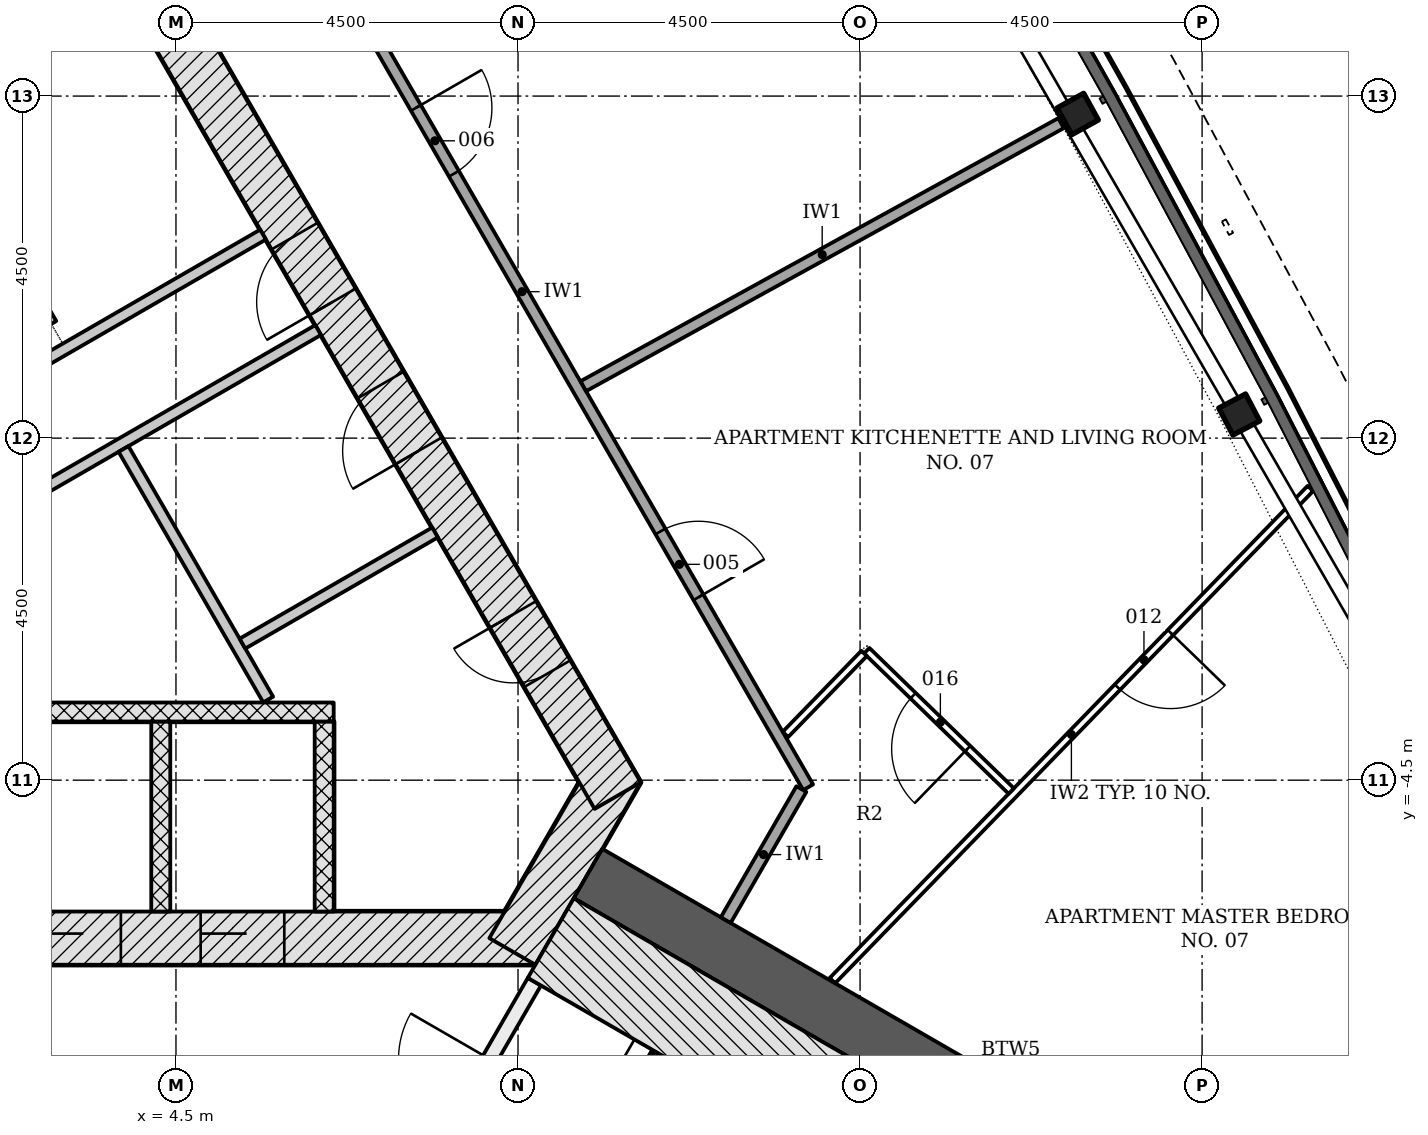
"""IFC4 building model, lengths in metres.
Left out: names, types, materials, properties, quantities, classifications, styles, units other than length and angle.
Written with IfcOpenShell. Run it as: python <this file> out.ifc"""

import sys

from ifc_helpers import new_model, si_unit, direction, frame, frame_2d, origin, origin_2d, place, context, subcontext, project, spatial, polyline, rectangle, i_section, outline, extrude, element, fill, save


model = new_model("IFC4")
c1 = context("Model", 3, precision=1e-05, world=origin(), true_north=direction((0.0, 1.0)))
c2 = subcontext(c1, "Body", "Model", "MODEL_VIEW")
j1 = project(units=[si_unit("LENGTHUNIT", "METRE"), si_unit("PLANEANGLEUNIT", "RADIAN")], contexts=[c1])
p1 = place(None, origin())
s1 = spatial("IfcSite", under=j1, at=p1, CompositionType="ELEMENT")
p2 = place(p1, origin())
s2 = spatial("IfcBuilding", under=s1, at=p2, CompositionType="ELEMENT")
p3 = place(p2, frame((0.0, 0.0, 116.7)))
s3 = spatial("IfcBuildingStorey", under=s2, at=p3, CompositionType="ELEMENT", Elevation=116.7)
p4 = place(p3, frame((-9.229, -6.578, -0.2), z_axis=(0.0, 0.0, 1.0), x_axis=(1.0, 0.0, 0.0)))
e1 = element("IfcWall", 1, at=p4, inside=s3, PredefinedType="SHEAR", context=c2, shape_type="SweptSolid", body=[
    extrude(rectangle(XDim=18.458, YDim=0.7, at=frame_2d((9.229, 0.0))), origin(), (0.0, 0.0, 1.0), 3.6),
])
p5 = place(p4, frame((3.304, 0.0, 0.2)))
e2 = element("IfcOpeningElement", 2, at=p5, cuts=e1, PredefinedType="OPENING", context=c2, shape_type="SweptSolid", body=[
    extrude(rectangle(XDim=1.1, YDim=2.1, at=frame_2d((0.55, 1.05))), frame((0.0, 0.36, 0.0), z_axis=(0.0, -1.0, 0.0), x_axis=(1.0, 0.0, 0.0)), (0.0, 0.0, 1.0), 0.72),
])
p6 = place(p4, frame((5.454, 0.0, 0.2)))
e3 = element("IfcOpeningElement", 3, at=p6, cuts=e1, PredefinedType="OPENING", context=c2, shape_type="SweptSolid", body=[
    extrude(rectangle(XDim=1.1, YDim=2.1, at=frame_2d((0.55, 1.05))), frame((0.0, 0.36, 0.0), z_axis=(0.0, -1.0, 0.0), x_axis=(1.0, 0.0, 0.0)), (0.0, 0.0, 1.0), 0.72),
])
p7 = place(p4, frame((7.604, 0.0, 0.2)))
e4 = element("IfcOpeningElement", 4, at=p7, cuts=e1, PredefinedType="OPENING", context=c2, shape_type="SweptSolid", body=[
    extrude(rectangle(XDim=1.1, YDim=2.1, at=frame_2d((0.55, 1.05))), frame((0.0, 0.36, 0.0), z_axis=(0.0, -1.0, 0.0), x_axis=(1.0, 0.0, 0.0)), (0.0, 0.0, 1.0), 0.72),
])
p8 = place(p4, frame((9.754, 0.0, 0.2)))
e5 = element("IfcOpeningElement", 5, at=p8, cuts=e1, PredefinedType="OPENING", context=c2, shape_type="SweptSolid", body=[
    extrude(rectangle(XDim=1.1, YDim=2.1, at=frame_2d((0.55, 1.05))), frame((0.0, 0.36, 0.0), z_axis=(0.0, -1.0, 0.0), x_axis=(1.0, 0.0, 0.0)), (0.0, 0.0, 1.0), 0.72),
])
p9 = place(p4, frame((11.904, 0.0, 0.2)))
e6 = element("IfcOpeningElement", 6, at=p9, cuts=e1, PredefinedType="OPENING", context=c2, shape_type="SweptSolid", body=[
    extrude(rectangle(XDim=1.1, YDim=2.1, at=frame_2d((0.55, 1.05))), frame((0.0, 0.36, 0.0), z_axis=(0.0, -1.0, 0.0), x_axis=(1.0, 0.0, 0.0)), (0.0, 0.0, 1.0), 0.72),
])
p10 = place(p4, frame((14.054, 0.0, 0.2)))
e7 = element("IfcOpeningElement", 7, at=p10, cuts=e1, PredefinedType="OPENING", context=c2, shape_type="SweptSolid", body=[
    extrude(rectangle(XDim=1.1, YDim=2.1, at=frame_2d((0.55, 1.05))), frame((0.0, 0.36, 0.0), z_axis=(0.0, -1.0, 0.0), x_axis=(1.0, 0.0, 0.0)), (0.0, 0.0, 1.0), 0.72),
])
p11 = place(p4, frame((0.926, 0.0, 0.2)))
e8 = element("IfcOpeningElement", 8, at=p11, cuts=e1, PredefinedType="OPENING", context=c2, shape_type="SweptSolid", body=[
    extrude(rectangle(XDim=0.9, YDim=2.1, at=frame_2d((0.45, 1.05))), frame((0.0, 0.36, 0.0), z_axis=(0.0, -1.0, 0.0), x_axis=(1.0, 0.0, 0.0)), (0.0, 0.0, 1.0), 0.72),
])
p12 = place(p3, frame((8.926, -6.753, -0.2), z_axis=(0.0, 0.0, 1.0), x_axis=(0.500042739161, 0.866000726912, 0.0)))
e9 = element("IfcWall", 9, at=p12, inside=s3, PredefinedType="SHEAR", context=c2, shape_type="SweptSolid", body=[
    extrude(rectangle(XDim=2.771, YDim=0.7, at=frame_2d((1.386, 0.0))), origin(), (0.0, 0.0, 1.0), 3.6),
])
p13 = place(p3, frame((10.311, -4.703, -0.2), z_axis=(0.0, 0.0, 1.0), x_axis=(-0.500001446645, 0.866024568562, 0.0)))
e10 = element("IfcWall", 10, at=p13, inside=s3, PredefinedType="SHEAR", context=c2, shape_type="SweptSolid", body=[
    extrude(rectangle(XDim=18.458, YDim=0.7, at=frame_2d((9.229, 0.0))), origin(), (0.0, 0.0, 1.0), 3.6),
])
p14 = place(p13, frame((7.5, 0.0, 0.2)))
e11 = element("IfcOpeningElement", 11, at=p14, cuts=e10, PredefinedType="OPENING", context=c2, shape_type="SweptSolid", body=[
    extrude(rectangle(XDim=1.0, YDim=2.1, at=frame_2d((0.5, 1.05))), frame((0.0, 0.36, 0.0), z_axis=(0.0, -1.0, 0.0), x_axis=(1.0, 0.0, 0.0)), (0.0, 0.0, 1.0), 0.72),
])
p15 = place(p13, frame((1.852, 0.0, 0.2)))
e12 = element("IfcOpeningElement", 12, at=p15, cuts=e10, PredefinedType="OPENING", context=c2, shape_type="SweptSolid", body=[
    extrude(rectangle(XDim=0.9, YDim=2.1, at=frame_2d((0.45, 1.05))), frame((0.0, 0.36, 0.0), z_axis=(0.0, -1.0, 0.0), x_axis=(1.0, 0.0, 0.0)), (0.0, 0.0, 1.0), 0.72),
])
p16 = place(p13, frame((5.238, 0.0, 0.2)))
e13 = element("IfcOpeningElement", 13, at=p16, cuts=e10, PredefinedType="OPENING", context=c2, shape_type="SweptSolid", body=[
    extrude(rectangle(XDim=1.0, YDim=2.1, at=frame_2d((0.5, 1.05))), frame((0.0, 0.36, 0.0), z_axis=(0.0, -1.0, 0.0), x_axis=(1.0, 0.0, 0.0)), (0.0, 0.0, 1.0), 0.72),
])
p17 = place(p13, frame((13.63, 0.0, 0.2)))
e14 = element("IfcOpeningElement", 14, at=p17, cuts=e10, PredefinedType="OPENING", context=c2, shape_type="SweptSolid", body=[
    extrude(rectangle(XDim=0.9, YDim=2.1, at=frame_2d((0.45, 1.05))), frame((0.0, 0.36, 0.0), z_axis=(0.0, -1.0, 0.0), x_axis=(1.0, 0.0, 0.0)), (0.0, 0.0, 1.0), 0.72),
])
p18 = place(p3, frame((9.922, -5.728, -0.2), z_axis=(0.0, 0.0, 1.0), x_axis=(0.866024913782, -0.500000848707, 0.0)))
e15 = element("IfcWall", 15, at=p18, inside=s3, PredefinedType="SHEAR", context=c2, shape_type="SweptSolid", body=[
    extrude(rectangle(XDim=11.539, YDim=0.75, at=frame_2d((5.769, 0.0))), origin(), (0.0, 0.0, 1.0), 3.6),
])
for number, where, z_axis, x_axis in (
    (16, (18.489, 0.311, -0.2), (0.0, 0.0, 1.0), (-0.464, 0.886, 0.0)),
    (17, (16.364, 4.265, -0.2), (0.0, 0.0, 1.0), (-0.482, 0.876, 0.0)),
):
    element("IfcColumn", number, at=place(p3, frame(where, z_axis=z_axis, x_axis=x_axis)), inside=s3, PredefinedType="COLUMN", context=c2, shape_type="SweptSolid", body=[
        extrude(i_section(OverallWidth=0.401, OverallDepth=0.399, WebThickness=0.025, FlangeThickness=0.04, FilletRadius=0.015, at=origin_2d()), origin(), (0.0, 0.0, 1.0), 3.6),
    ])
p19 = place(p3, origin())
e18 = element("IfcWall", 18, at=p19, inside=s3, PredefinedType="NOTDEFINED", context=c2, shape_type="SweptSolid", body=[
    extrude(outline(polyline([(17.98, -16.169), (19.999, -15.995), (21.449, -15.625), (22.711, -14.819), (23.656, -13.658), (24.189, -12.259), (24.257, -10.763), (23.852, -9.322), (22.993, -7.487), (22.721, -7.614), (23.57, -9.426), (23.955, -10.798), (23.891, -12.197), (23.393, -13.506), (22.509, -14.592), (21.328, -15.347), (19.948, -15.699), (17.955, -15.87), (17.98, -16.169)])), origin(), (0.0, 0.0, 1.0), 3.3),
])
for number, where, z_axis, x_axis in (
    (19, (4.3, -6.228, -0.2), (0.0, 0.0, 1.0), (0.0, 1.0, 0.0)),
    (20, (6.45, -6.228, -0.2), (0.0, 0.0, 1.0), (0.0, 1.0, 0.0)),
):
    element("IfcWall", number, at=place(p3, frame(where, z_axis=z_axis, x_axis=x_axis)), inside=s3, PredefinedType="PARTITIONING", context=c2, shape_type="SweptSolid", body=[
        extrude(rectangle(XDim=2.5, YDim=0.25, at=frame_2d((1.25, 0.0))), origin(), (0.0, 0.0, 1.0), 3.6),
    ])
p20 = place(p3, frame((-6.575, -3.603, 0.0), z_axis=(0.0, 0.0, 1.0), x_axis=(1.0, 0.0, 0.0)))
e21 = element("IfcWall", 21, at=p20, inside=s3, PredefinedType="PARTITIONING", context=c2, shape_type="SweptSolid", body=[
    extrude(rectangle(XDim=13.15, YDim=0.25, at=frame_2d((6.575, 0.0))), origin(), (0.0, 0.0, 1.0), 3.4),
])
p21 = place(p3, frame((-4.904, -3.413, 0.0), z_axis=(0.0, 0.0, 1.0), x_axis=(0.866020716117, 0.500008119189, 0.0)))
e22 = element("IfcWall", 22, at=p21, inside=s3, PredefinedType="PARTITIONING", context=c2, shape_type="SweptSolid", body=[
    extrude(rectangle(XDim=12.182, YDim=0.15, at=frame_2d((6.091, 0.0))), origin(), (0.0, 0.0, 1.0), 3.4),
])
p22 = place(p21, frame((4.142, 0.0, 0.0)))
e23 = element("IfcOpeningElement", 23, at=p22, cuts=e22, PredefinedType="OPENING", context=c2, shape_type="SweptSolid", body=[
    extrude(rectangle(XDim=0.9, YDim=2.1, at=frame_2d((0.45, 1.05))), frame((0.0, 0.085, 0.0), z_axis=(0.0, -1.0, 0.0), x_axis=(1.0, 0.0, 0.0)), (0.0, 0.0, 1.0), 0.17),
])
p23 = place(p3, frame((-2.004, -3.413, 0.0), z_axis=(0.0, 0.0, 1.0), x_axis=(0.866030034802, 0.499991978756, 0.0)))
e24 = element("IfcWall", 24, at=p23, inside=s3, PredefinedType="PARTITIONING", context=c2, shape_type="SweptSolid", body=[
    extrude(rectangle(XDim=9.671, YDim=0.15, at=frame_2d((4.835, 0.0))), origin(), (0.0, 0.0, 1.0), 3.4),
])
p24 = place(p23, frame((2.886, 0.0, 0.0)))
e25 = element("IfcOpeningElement", 25, at=p24, cuts=e24, PredefinedType="OPENING", context=c2, shape_type="SweptSolid", body=[
    extrude(rectangle(XDim=0.9, YDim=2.1, at=frame_2d((0.45, 1.05))), frame((0.0, 0.085, 0.0), z_axis=(0.0, -1.0, 0.0), x_axis=(1.0, 0.0, 0.0)), (0.0, 0.0, 1.0), 0.17),
])
p25 = place(p3, frame((2.86, 1.503, 0.0), z_axis=(0.0, 0.0, 1.0), x_axis=(-0.500014382217, 0.866017100048, 0.0)))
e26 = element("IfcWall", 26, at=p25, inside=s3, PredefinedType="PARTITIONING", context=c2, shape_type="SweptSolid", body=[
    extrude(rectangle(XDim=5.502, YDim=0.15, at=frame_2d((2.751, 0.0))), origin(), (0.0, 0.0, 1.0), 3.4),
])
p26 = place(p3, frame((5.713, -3.439, 0.0), z_axis=(0.0, 0.0, 1.0), x_axis=(-0.499981559197, 0.866036050325, 0.0)))
e27 = element("IfcWall", 27, at=p26, inside=s3, PredefinedType="PARTITIONING", context=c2, shape_type="SweptSolid", body=[
    extrude(rectangle(XDim=3.806, YDim=0.15, at=frame_2d((1.903, 0.0))), origin(), (0.0, 0.0, 1.0), 3.4),
])
p27 = place(p3, frame((5.375, -2.703, 0.0), z_axis=(0.0, 0.0, 1.0), x_axis=(0.866046596414, 0.499963291492, 0.0)))
e28 = element("IfcWall", 28, at=p27, inside=s3, PredefinedType="PARTITIONING", context=c2, shape_type="SweptSolid", body=[
    extrude(rectangle(XDim=2.925, YDim=0.15, at=frame_2d((1.462, 0.0))), origin(), (0.0, 0.0, 1.0), 3.4),
])
p28 = place(p3, frame((7.44, -10.226, -0.2), z_axis=(0.0, 0.0, 1.0), x_axis=(0.500022077904, 0.866012656725, 0.0)))
e29 = element("IfcWall", 29, at=p28, inside=s3, PredefinedType="SHEAR", context=c2, shape_type="SweptSolid", body=[
    extrude(rectangle(XDim=3.55, YDim=0.2, at=frame_2d((1.775, 0.0))), origin(), (0.0, 0.0, 1.0), 3.6),
])
p29 = place(p28, frame((1.175, 0.0, 0.2)))
e30 = element("IfcOpeningElement", 30, at=p29, cuts=e29, PredefinedType="OPENING", context=c2, shape_type="SweptSolid", body=[
    extrude(rectangle(XDim=1.2, YDim=2.1, at=frame_2d((0.6, 1.05))), frame((0.0, 0.11, 0.0), z_axis=(0.0, -1.0, 0.0), x_axis=(1.0, 0.0, 0.0)), (0.0, 0.0, 1.0), 0.22),
])
p30 = place(p3, frame((9.431, -6.577, -0.2), z_axis=(0.0, 0.0, 1.0), x_axis=(0.866018442252, -0.500012057535, 0.0)))
e31 = element("IfcWall", 31, at=p30, inside=s3, PredefinedType="SHEAR", context=c2, shape_type="SweptSolid", body=[
    extrude(rectangle(XDim=7.2, YDim=1.211, at=frame_2d((3.6, 0.0))), origin(), (0.0, 0.0, 1.0), 3.6),
])
p31 = place(p3, frame((5.289, 8.446, 0.0), z_axis=(0.0, 0.0, 1.0), x_axis=(0.499996620721, -0.866027354803, 0.0)))
e32 = element("IfcWall", 32, at=p31, inside=s3, PredefinedType="PARTITIONING", context=c2, shape_type="SweptSolid", body=[
    extrude(rectangle(XDim=15.057, YDim=0.15, at=frame_2d((7.528, 0.0))), origin(), (0.0, 0.0, 1.0), 2.847),
])
p32 = place(p31, frame((11.17, 0.0, 0.0)))
e33 = element("IfcOpeningElement", 33, at=p32, cuts=e32, PredefinedType="OPENING", context=c2, shape_type="SweptSolid", body=[
    extrude(rectangle(XDim=1.0, YDim=2.1, at=frame_2d((0.5, 1.05))), frame((0.0, 0.085, 0.0), z_axis=(0.0, -1.0, 0.0), x_axis=(1.0, 0.0, 0.0)), (0.0, 0.0, 1.0), 0.17),
])
p33 = place(p31, frame((4.736, 0.0, 0.0)))
e34 = element("IfcOpeningElement", 34, at=p33, cuts=e32, PredefinedType="OPENING", context=c2, shape_type="SweptSolid", body=[
    extrude(rectangle(XDim=1.0, YDim=2.1, at=frame_2d((0.5, 1.05))), frame((0.0, 0.085, 0.0), z_axis=(0.0, -1.0, 0.0), x_axis=(1.0, 0.0, 0.0)), (0.0, 0.0, 1.0), 0.17),
])
p34 = place(p3, frame((11.733, -6.341, 0.0), z_axis=(0.0, 0.0, 1.0), x_axis=(0.50003033167, 0.866007891078, 0.0)))
e35 = element("IfcWall", 35, at=p34, inside=s3, PredefinedType="PARTITIONING", context=c2, shape_type="SweptSolid", body=[
    extrude(rectangle(XDim=1.991, YDim=0.15, at=frame_2d((0.995, 0.0))), origin(), (0.0, 0.0, 1.0), 3.4),
])
p35 = place(p3, frame((16.145, 4.144, 0.0), z_axis=(0.0, 0.0, 1.0), x_axis=(-0.875990246448, -0.482328817434, 0.0)))
e36 = element("IfcWall", 36, at=p35, inside=s3, PredefinedType="PARTITIONING", context=c2, shape_type="SweptSolid", body=[
    extrude(rectangle(XDim=7.176, YDim=0.15, at=frame_2d((3.588, 0.0))), origin(), (0.0, 0.0, 1.0), 2.847),
])
p36 = place(p3, frame((19.425, -0.662, 0.0), z_axis=(0.0, 0.0, 1.0), x_axis=(-0.696698602336, -0.717363964458, 0.0)))
e37 = element("IfcWall", 37, at=p36, inside=s3, PredefinedType="PARTITIONING", context=c2, shape_type="SweptSolid", body=[
    extrude(rectangle(XDim=9.026, YDim=0.1, at=frame_2d((4.513, 0.0))), origin(), (0.0, 0.0, 1.0), 2.974),
])
p37 = place(p36, frame((2.643, 0.0, 0.0)))
e38 = element("IfcOpeningElement", 38, at=p37, cuts=e37, PredefinedType="OPENING", context=c2, shape_type="SweptSolid", body=[
    extrude(rectangle(XDim=1.0, YDim=2.1, at=frame_2d((0.5, 1.05))), frame((0.0, 0.06, 0.0), z_axis=(0.0, -1.0, 0.0), x_axis=(1.0, 0.0, 0.0)), (0.0, 0.0, 1.0), 0.12),
])
p38 = place(p3, frame((15.489, -4.643, 0.0), z_axis=(0.0, 0.0, 1.0), x_axis=(-0.717350421595, 0.696712546635, 0.0)))
e39 = element("IfcWall", 39, at=p38, inside=s3, PredefinedType="PARTITIONING", context=c2, shape_type="SweptSolid", body=[
    extrude(rectangle(XDim=2.65, YDim=0.1, at=frame_2d((1.325, 0.0))), origin(), (0.0, 0.0, 1.0), 3.4),
])
p39 = place(p38, frame((0.8, 0.0, 0.0)))
e40 = element("IfcOpeningElement", 40, at=p39, cuts=e39, PredefinedType="OPENING", context=c2, shape_type="SweptSolid", body=[
    extrude(rectangle(XDim=1.0, YDim=2.1, at=frame_2d((0.5, 1.05))), frame((0.0, 0.06, 0.0), z_axis=(0.0, -1.0, 0.0), x_axis=(1.0, 0.0, 0.0)), (0.0, 0.0, 1.0), 0.12),
])
p40 = place(p3, frame((12.518, -3.898, 0.0), z_axis=(0.0, 0.0, 1.0), x_axis=(0.69667940227, 0.717382610922, 0.0)))
e41 = element("IfcWall", 41, at=p40, inside=s3, PredefinedType="PARTITIONING", context=c2, shape_type="SweptSolid", body=[
    extrude(rectangle(XDim=1.486, YDim=0.1, at=frame_2d((0.743, 0.0))), origin(), (0.0, 0.0, 1.0), 3.4),
])
p41 = place(p9, origin())
e42 = element("IfcDoor", 42, at=p41, inside=s3, OperationType="DOUBLE_DOOR_SLIDING", PredefinedType="DOOR", context=c2, shape_type="SweptSolid", body=[
    extrude(rectangle(XDim=1.1, YDim=2.1, at=frame_2d((0.55, 1.05))), frame((0.0, 0.025, 0.0), z_axis=(0.0, -1.0, 0.0), x_axis=(1.0, 0.0, 0.0)), (0.0, 0.0, 1.0), 0.05),
])
fill(e6, e42)
p42 = place(p10, origin())
e43 = element("IfcDoor", 43, at=p42, inside=s3, OperationType="DOUBLE_DOOR_SLIDING", PredefinedType="DOOR", context=c2, shape_type="SweptSolid", body=[
    extrude(rectangle(XDim=1.1, YDim=2.1, at=frame_2d((0.55, 1.05))), frame((0.0, 0.025, 0.0), z_axis=(0.0, -1.0, 0.0), x_axis=(1.0, 0.0, 0.0)), (0.0, 0.0, 1.0), 0.05),
])
fill(e7, e43)
p43 = place(p14, origin())
e44 = element("IfcDoor", 44, at=p43, inside=s3, OperationType="SINGLE_SWING_LEFT", PredefinedType="DOOR", context=c2, shape_type="SweptSolid", body=[
    extrude(rectangle(XDim=1.0, YDim=2.1, at=frame_2d((0.5, 1.05))), frame((0.0, 0.075, 0.0), z_axis=(0.0, -1.0, 0.0), x_axis=(1.0, 0.0, 0.0)), (0.0, 0.0, 1.0), 0.15),
])
fill(e11, e44)
p44 = place(p15, origin())
e45 = element("IfcDoor", 45, at=p44, inside=s3, OperationType="SINGLE_SWING_RIGHT", PredefinedType="DOOR", context=c2, shape_type="SweptSolid", body=[
    extrude(rectangle(XDim=0.9, YDim=2.1, at=frame_2d((0.45, 1.05))), frame((0.0, 0.075, 0.0), z_axis=(0.0, -1.0, 0.0), x_axis=(1.0, 0.0, 0.0)), (0.0, 0.0, 1.0), 0.15),
])
fill(e12, e45)
p45 = place(p16, origin())
e46 = element("IfcDoor", 46, at=p45, inside=s3, OperationType="SINGLE_SWING_LEFT", PredefinedType="DOOR", context=c2, shape_type="SweptSolid", body=[
    extrude(rectangle(XDim=1.0, YDim=2.1, at=frame_2d((0.5, 1.05))), frame((0.0, 0.075, 0.0), z_axis=(0.0, -1.0, 0.0), x_axis=(1.0, 0.0, 0.0)), (0.0, 0.0, 1.0), 0.15),
])
fill(e13, e46)
p46 = place(p32, origin())
e47 = element("IfcDoor", 47, at=p46, inside=s3, OperationType="SINGLE_SWING_RIGHT", PredefinedType="DOOR", context=c2, shape_type="SweptSolid", body=[
    extrude(rectangle(XDim=1.0, YDim=2.1, at=frame_2d((0.5, 1.05))), frame((0.0, 0.025, 0.0), z_axis=(0.0, -1.0, 0.0), x_axis=(1.0, 0.0, 0.0)), (0.0, 0.0, 1.0), 0.05),
])
fill(e33, e47)
p47 = place(p33, origin())
e48 = element("IfcDoor", 48, at=p47, inside=s3, OperationType="SINGLE_SWING_LEFT", PredefinedType="DOOR", context=c2, shape_type="SweptSolid", body=[
    extrude(rectangle(XDim=1.0, YDim=2.1, at=frame_2d((0.5, 1.05))), frame((0.0, 0.025, 0.0), z_axis=(0.0, -1.0, 0.0), x_axis=(1.0, 0.0, 0.0)), (0.0, 0.0, 1.0), 0.05),
])
fill(e34, e48)
p48 = place(p37, origin())
e49 = element("IfcDoor", 49, at=p48, inside=s3, OperationType="SINGLE_SWING_LEFT", PredefinedType="DOOR", context=c2, shape_type="SweptSolid", body=[
    extrude(rectangle(XDim=1.0, YDim=2.1, at=frame_2d((0.5, 1.05))), frame((0.0, 0.025, 0.0), z_axis=(0.0, -1.0, 0.0), x_axis=(1.0, 0.0, 0.0)), (0.0, 0.0, 1.0), 0.05),
])
fill(e38, e49)
p49 = place(p39, origin())
e50 = element("IfcDoor", 50, at=p49, inside=s3, OperationType="SINGLE_SWING_LEFT", PredefinedType="DOOR", context=c2, shape_type="SweptSolid", body=[
    extrude(rectangle(XDim=1.0, YDim=2.1, at=frame_2d((0.5, 1.05))), frame((0.0, 0.025, 0.0), z_axis=(0.0, -1.0, 0.0), x_axis=(1.0, 0.0, 0.0)), (0.0, 0.0, 1.0), 0.05),
])
fill(e40, e50)
save(model, sys.argv[1])
